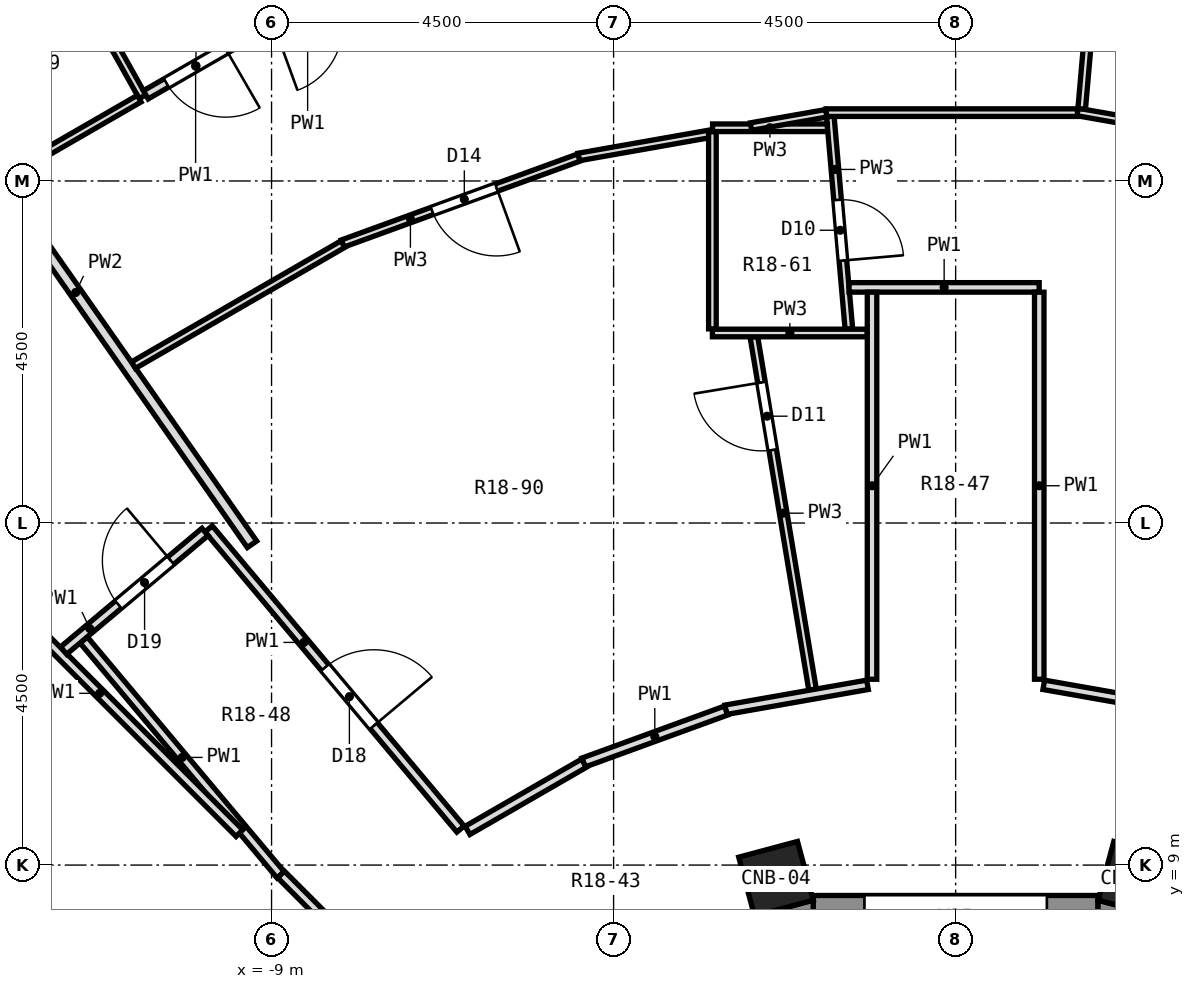
"""IFC4 building model, lengths in metres.
Left out: names, types, materials, properties, quantities, classifications, styles, units other than length and angle.
Written with IfcOpenShell. Run it as: python <this file> out.ifc"""

import sys

from ifc_helpers import new_model, si_unit, direction, frame, frame_2d, origin, origin_2d, place, context, subcontext, project, spatial, polyline, rectangle, outline, extrude, element, fill, save


model = new_model("IFC4")
c1 = context("Model", 3, precision=1e-05, world=origin(), true_north=direction((0.0, 1.0)))
c2 = subcontext(c1, "Body", "Model", "MODEL_VIEW")
j1 = project(units=[si_unit("LENGTHUNIT", "METRE"), si_unit("PLANEANGLEUNIT", "RADIAN")], contexts=[c1])
p1 = place(None, origin())
s1 = spatial("IfcSite", under=j1, at=p1, CompositionType="ELEMENT")
p2 = place(p1, origin())
s2 = spatial("IfcBuilding", under=s1, at=p2, CompositionType="ELEMENT")
p3 = place(p2, frame((0.0, 0.0, 101.8)))
s3 = spatial("IfcBuildingStorey", under=s2, at=p3, CompositionType="ELEMENT", Elevation=101.8)
for number, where, z_axis, x_axis in (
    (1, (2.364, 8.821, 0.0), (0.0, 0.0, 1.0), (0.259, 0.966, 0.0)),
    (2, (-2.364, 8.821, 0.0), (0.0, 0.0, 1.0), (-0.259, 0.966, 0.0)),
):
    element("IfcColumn", number, at=place(p3, frame(where, z_axis=z_axis, x_axis=x_axis)), inside=s3, PredefinedType="COLUMN", context=c2, shape_type="SweptSolid", body=[
        extrude(rectangle(XDim=0.8, YDim=0.8, at=origin_2d()), origin(), (0.0, 0.0, 1.0), 3.3),
    ])
p4 = place(p3, frame((1.874, 8.3, 0.0), z_axis=(0.0, 0.0, 1.0), x_axis=(-1.0, 0.0, 0.0)))
e3 = element("IfcWall", 3, at=p4, inside=s3, PredefinedType="SOLIDWALL", context=c2, shape_type="SweptSolid", body=[
    extrude(rectangle(XDim=3.748, YDim=0.6, at=frame_2d((1.874, 0.0))), origin(), (0.0, 0.0, 1.0), 2.8),
])
p5 = place(p4, frame((0.674, 0.0, 0.9)))
e4 = element("IfcOpeningElement", 4, at=p5, cuts=e3, PredefinedType="OPENING", context=c2, shape_type="SweptSolid", body=[
    extrude(rectangle(XDim=2.4, YDim=1.8, at=frame_2d((1.2, 0.9))), frame((0.0, 0.312, 0.0), z_axis=(0.0, -1.0, 0.0), x_axis=(1.0, 0.0, 0.0)), (0.0, 0.0, 1.0), 0.624),
])
p6 = place(p3, origin())
e5 = element("IfcWall", 5, at=p6, inside=s3, PredefinedType="SOLIDWALL", context=c2, shape_type="SweptSolid", body=[
    extrude(outline(polyline([(1.874, 8.538), (1.874, 8.0), (2.377, 7.865), (2.646, 8.331), (1.874, 8.538)])), origin(), (0.0, 0.0, 1.0), 2.8),
])
p7 = place(p3, origin())
e6 = element("IfcWall", 6, at=p7, inside=s3, PredefinedType="SOLIDWALL", context=c2, shape_type="SweptSolid", body=[
    extrude(outline(polyline([(-2.646, 8.331), (-2.377, 7.865), (-1.874, 8.0), (-1.874, 8.538), (-2.646, 8.331)])), origin(), (0.0, 0.0, 1.0), 2.8),
])
p8 = place(p3, frame((-1.649, 18.849, 0.0), z_axis=(0.0, 0.0, 1.0), x_axis=(0.087061215869, -0.996202963603, 0.0)))
e7 = element("IfcWall", 7, at=p8, inside=s3, PredefinedType="PARTITIONING", context=c2, shape_type="SweptSolid", body=[
    extrude(rectangle(XDim=2.807, YDim=0.1, at=frame_2d((1.404, 0.0))), origin(), (0.0, 0.0, 1.0), 2.8),
])
p9 = place(p8, frame((1.103, 0.0, 0.0)))
e8 = element("IfcOpeningElement", 8, at=p9, cuts=e7, PredefinedType="OPENING", context=c2, shape_type="SweptSolid", body=[
    extrude(rectangle(XDim=0.8, YDim=2.1, at=frame_2d((0.4, 1.05))), frame((0.0, 0.062, 0.0), z_axis=(0.0, -1.0, 0.0), x_axis=(1.0, 0.0, 0.0)), (0.0, 0.0, 1.0), 0.124),
])
p10 = place(p3, frame((-2.655, 15.951, 0.0), z_axis=(0.0, 0.0, 1.0), x_axis=(0.164012054584, -0.986458334625, 0.0)))
e9 = element("IfcWall", 9, at=p10, inside=s3, PredefinedType="PARTITIONING", context=c2, shape_type="SweptSolid", body=[
    extrude(rectangle(XDim=4.707, YDim=0.1, at=frame_2d((2.354, 0.0))), origin(), (0.0, 0.0, 1.0), 2.8),
])
p11 = place(p10, frame((0.61, 0.0, 0.0)))
e10 = element("IfcOpeningElement", 10, at=p11, cuts=e9, PredefinedType="OPENING", context=c2, shape_type="SweptSolid", body=[
    extrude(rectangle(XDim=0.9, YDim=2.1, at=frame_2d((0.45, 1.05))), frame((0.0, 0.062, 0.0), z_axis=(0.0, -1.0, 0.0), x_axis=(1.0, 0.0, 0.0)), (0.0, 0.0, 1.0), 0.124),
])
p12 = place(p3, frame((-11.822, 21.115, 0.0), z_axis=(0.0, 0.0, 1.0), x_axis=(0.488622759198, -0.872495157117, 0.0)))
e11 = element("IfcWall", 11, at=p12, inside=s3, PredefinedType="PARTITIONING", context=c2, shape_type="SweptSolid", body=[
    extrude(rectangle(XDim=2.3, YDim=0.1, at=frame_2d((1.15, 0.0))), origin(), (0.0, 0.0, 1.0), 2.8),
])
p13 = place(p3, frame((-13.896, 19.846, 0.0), z_axis=(0.0, 0.0, 1.0), x_axis=(0.573571733859, -0.819155336989, 0.0)))
e12 = element("IfcWall", 12, at=p13, inside=s3, PredefinedType="PARTITIONING", context=c2, shape_type="SweptSolid", body=[
    extrude(rectangle(XDim=8.088, YDim=0.15, at=frame_2d((4.044, 0.0))), origin(), (0.0, 0.0, 1.0), 2.8),
])
p14 = place(p3, frame((-11.472, 11.962, 0.0), z_axis=(0.0, 0.0, 1.0), x_axis=(0.642533165624, -0.766257875048, 0.0)))
e13 = element("IfcWall", 13, at=p14, inside=s3, PredefinedType="PARTITIONING", context=c2, shape_type="SweptSolid", body=[
    extrude(rectangle(XDim=4.033, YDim=0.125, at=frame_2d((2.017, 0.0))), origin(), (0.0, 0.0, 1.0), 2.8),
])
p15 = place(p3, frame((-9.828, 13.423, 0.0), z_axis=(0.0, 0.0, 1.0), x_axis=(0.642779949684, -0.766050870559, 0.0)))
e14 = element("IfcWall", 14, at=p15, inside=s3, PredefinedType="PARTITIONING", context=c2, shape_type="SweptSolid", body=[
    extrude(rectangle(XDim=5.155, YDim=0.125, at=frame_2d((2.578, 0.0))), origin(), (0.0, 0.0, 1.0), 2.8),
])
p16 = place(p15, frame((2.381, 0.0, 0.0)))
e15 = element("IfcOpeningElement", 15, at=p16, cuts=e14, PredefinedType="OPENING", context=c2, shape_type="SweptSolid", body=[
    extrude(rectangle(XDim=1.0, YDim=2.1, at=frame_2d((0.5, 1.05))), frame((0.0, 0.074, 0.0), z_axis=(0.0, -1.0, 0.0), x_axis=(1.0, 0.0, 0.0)), (0.0, 0.0, 1.0), 0.149),
])
p17 = place(p3, frame((-8.875, 8.876, 0.0), z_axis=(0.0, 0.0, 1.0), x_axis=(0.706666079052, -0.707547208826, 0.0)))
e16 = element("IfcWall", 16, at=p17, inside=s3, PredefinedType="PARTITIONING", context=c2, shape_type="SweptSolid", body=[
    extrude(rectangle(XDim=1.108, YDim=0.125, at=frame_2d((0.554, 0.0))), origin(), (0.0, 0.0, 1.0), 2.8),
])
p18 = place(p3, frame((-13.101, 13.099, 0.0), z_axis=(0.0, 0.0, 1.0), x_axis=(0.707106781187, -0.707106781187, 0.0)))
e17 = element("IfcWall", 17, at=p18, inside=s3, PredefinedType="PARTITIONING", context=c2, shape_type="SweptSolid", body=[
    extrude(rectangle(XDim=5.203, YDim=0.125, at=frame_2d((2.602, 0.0))), origin(), (0.0, 0.0, 1.0), 2.8),
])
p19 = place(p3, frame((1.16, 11.371, 0.0), z_axis=(0.0, 0.0, 1.0), x_axis=(0.984859944288, -0.173351925678, 0.0)))
e18 = element("IfcWall", 18, at=p19, inside=s3, PredefinedType="PARTITIONING", context=c2, shape_type="SweptSolid", body=[
    extrude(rectangle(XDim=1.768, YDim=0.125, at=frame_2d((0.884, 0.0))), origin(), (0.0, 0.0, 1.0), 2.8),
])
p20 = place(p3, frame((1.603, 18.908, 0.0), z_axis=(0.0, 0.0, 1.0), x_axis=(0.984831814927, -0.173511660439, 0.0)))
e19 = element("IfcWall", 19, at=p20, inside=s3, PredefinedType="PARTITIONING", context=c2, shape_type="SweptSolid", body=[
    extrude(rectangle(XDim=3.308, YDim=0.1, at=frame_2d((1.654, 0.0))), origin(), (0.0, 0.0, 1.0), 2.8),
])
p21 = place(p3, frame((-3.2, 16.0, 0.0), z_axis=(0.0, 0.0, 1.0), x_axis=(1.0, 0.0, 0.0)))
e20 = element("IfcWall", 20, at=p21, inside=s3, PredefinedType="PARTITIONING", context=c2, shape_type="SweptSolid", body=[
    extrude(rectangle(XDim=2.037, YDim=0.1, at=frame_2d((1.019, 0.0))), origin(), (0.0, 0.0, 1.0), 2.8),
])
p22 = place(p3, frame((-1.402, 16.6, 0.0), z_axis=(0.0, 0.0, 1.0), x_axis=(1.0, 0.0, 0.0)))
e21 = element("IfcWall", 21, at=p22, inside=s3, PredefinedType="PARTITIONING", context=c2, shape_type="SweptSolid", body=[
    extrude(rectangle(XDim=2.501, YDim=0.125, at=frame_2d((1.251, 0.0))), origin(), (0.0, 0.0, 1.0), 2.8),
])
p23 = place(p3, frame((-3.198, 18.7, 0.0), z_axis=(0.0, 0.0, 1.0), x_axis=(1.0, 0.0, 0.0)))
e22 = element("IfcWall", 22, at=p23, inside=s3, PredefinedType="PARTITIONING", context=c2, shape_type="SweptSolid", body=[
    extrude(rectangle(XDim=1.511, YDim=0.1, at=frame_2d((0.755, 0.0))), origin(), (0.0, 0.0, 1.0), 2.8),
])
p24 = place(p3, frame((-1.704, 18.899, 0.0), z_axis=(0.0, 0.0, 1.0), x_axis=(1.0, 0.0, 0.0)))
e23 = element("IfcWall", 23, at=p24, inside=s3, PredefinedType="PARTITIONING", context=c2, shape_type="SweptSolid", body=[
    extrude(rectangle(XDim=3.307, YDim=0.1, at=frame_2d((1.653, 0.0))), origin(), (0.0, 0.0, 1.0), 2.8),
])
p25 = place(p3, frame((-3.024, 11.043, 0.0), z_axis=(0.0, 0.0, 1.0), x_axis=(0.984843218933, 0.173446920187, 0.0)))
e24 = element("IfcWall", 24, at=p25, inside=s3, PredefinedType="PARTITIONING", context=c2, shape_type="SweptSolid", body=[
    extrude(rectangle(XDim=1.893, YDim=0.125, at=frame_2d((0.947, 0.0))), origin(), (0.0, 0.0, 1.0), 2.8),
])
p26 = place(p3, frame((-4.96, 18.315, 0.0), z_axis=(0.0, 0.0, 1.0), x_axis=(0.984767989426, 0.173873537385, 0.0)))
e25 = element("IfcWall", 25, at=p26, inside=s3, PredefinedType="PARTITIONING", context=c2, shape_type="SweptSolid", body=[
    extrude(rectangle(XDim=1.737, YDim=0.1, at=frame_2d((0.868, 0.0))), origin(), (0.0, 0.0, 1.0), 2.8),
])
p27 = place(p3, frame((-2.692, 18.716, 0.0), z_axis=(0.0, 0.0, 1.0), x_axis=(0.984773780307, 0.173840736366, 0.0)))
e26 = element("IfcWall", 26, at=p27, inside=s3, PredefinedType="PARTITIONING", context=c2, shape_type="SweptSolid", body=[
    extrude(rectangle(XDim=1.006, YDim=0.1, at=frame_2d((0.503, 0.0))), origin(), (0.0, 0.0, 1.0), 2.8),
])
p28 = place(p3, frame((-4.896, 10.349, 0.0), z_axis=(0.0, 0.0, 1.0), x_axis=(0.939546719529, 0.342420738016, 0.0)))
e27 = element("IfcWall", 27, at=p28, inside=s3, PredefinedType="PARTITIONING", context=c2, shape_type="SweptSolid", body=[
    extrude(rectangle(XDim=1.996, YDim=0.125, at=frame_2d((0.998, 0.0))), origin(), (0.0, 0.0, 1.0), 2.8),
])
p29 = place(p3, frame((-8.066, 17.177, 0.0), z_axis=(0.0, 0.0, 1.0), x_axis=(0.939726606236, 0.341926754629, 0.0)))
e28 = element("IfcWall", 28, at=p29, inside=s3, PredefinedType="PARTITIONING", context=c2, shape_type="SweptSolid", body=[
    extrude(rectangle(XDim=3.308, YDim=0.1, at=frame_2d((1.654, 0.0))), origin(), (0.0, 0.0, 1.0), 2.8),
])
p30 = place(p29, frame((1.254, 0.0, 0.0)))
e29 = element("IfcOpeningElement", 29, at=p30, cuts=e28, PredefinedType="OPENING", context=c2, shape_type="SweptSolid", body=[
    extrude(rectangle(XDim=0.9, YDim=2.1, at=frame_2d((0.45, 1.05))), frame((0.0, 0.062, 0.0), z_axis=(0.0, -1.0, 0.0), x_axis=(1.0, 0.0, 0.0)), (0.0, 0.0, 1.0), 0.124),
])
p31 = place(p3, frame((-6.421, 9.456, 0.0), z_axis=(0.0, 0.0, 1.0), x_axis=(0.866153397047, 0.499778243608, 0.0)))
e30 = element("IfcWall", 30, at=p31, inside=s3, PredefinedType="PARTITIONING", context=c2, shape_type="SweptSolid", body=[
    extrude(rectangle(XDim=1.768, YDim=0.125, at=frame_2d((0.884, 0.0))), origin(), (0.0, 0.0, 1.0), 2.8),
])
p32 = place(p3, frame((-10.816, 15.578, 0.0), z_axis=(0.0, 0.0, 1.0), x_axis=(0.865900530636, 0.500216224292, 0.0)))
e31 = element("IfcWall", 31, at=p32, inside=s3, PredefinedType="PARTITIONING", context=c2, shape_type="SweptSolid", body=[
    extrude(rectangle(XDim=3.181, YDim=0.1, at=frame_2d((1.591, 0.0))), origin(), (0.0, 0.0, 1.0), 2.8),
])
p33 = place(p3, frame((-12.542, 18.044, 0.0), z_axis=(0.0, 0.0, 1.0), x_axis=(0.866154304779, 0.499776670437, 0.0)))
e32 = element("IfcWall", 32, at=p33, inside=s3, PredefinedType="PARTITIONING", context=c2, shape_type="SweptSolid", body=[
    extrude(rectangle(XDim=2.079, YDim=0.1, at=frame_2d((1.04, 0.0))), origin(), (0.0, 0.0, 1.0), 2.8),
])
p34 = place(p3, frame((-10.655, 19.133, 0.0), z_axis=(0.0, 0.0, 1.0), x_axis=(0.866040510187, 0.49997383403, 0.0)))
e33 = element("IfcWall", 33, at=p34, inside=s3, PredefinedType="PARTITIONING", context=c2, shape_type="SweptSolid", body=[
    extrude(rectangle(XDim=1.513, YDim=0.125, at=frame_2d((0.757, 0.0))), origin(), (0.0, 0.0, 1.0), 2.8),
])
p35 = place(p34, frame((0.313, 0.0, 0.0)))
e34 = element("IfcOpeningElement", 34, at=p35, cuts=e33, PredefinedType="OPENING", context=c2, shape_type="SweptSolid", body=[
    extrude(rectangle(XDim=0.9, YDim=2.1, at=frame_2d((0.45, 1.05))), frame((0.0, 0.074, 0.0), z_axis=(0.0, -1.0, 0.0), x_axis=(1.0, 0.0, 0.0)), (0.0, 0.0, 1.0), 0.149),
])
p36 = place(p3, frame((-11.736, 11.822, 0.0), z_axis=(0.0, 0.0, 1.0), x_axis=(0.765966295507, 0.642880730888, 0.0)))
e35 = element("IfcWall", 35, at=p36, inside=s3, PredefinedType="PARTITIONING", context=c2, shape_type="SweptSolid", body=[
    extrude(rectangle(XDim=2.428, YDim=0.125, at=frame_2d((1.214, 0.0))), origin(), (0.0, 0.0, 1.0), 2.8),
])
p37 = place(p36, frame((0.941, 0.0, 0.0)))
e36 = element("IfcOpeningElement", 36, at=p37, cuts=e35, PredefinedType="OPENING", context=c2, shape_type="SweptSolid", body=[
    extrude(rectangle(XDim=0.9, YDim=2.1, at=frame_2d((0.45, 1.05))), frame((0.0, 0.074, 0.0), z_axis=(0.0, -1.0, 0.0), x_axis=(1.0, 0.0, 0.0)), (0.0, 0.0, 1.0), 0.149),
])
p38 = place(p3, frame((1.658, 18.949, 0.0), z_axis=(0.0, 0.0, 1.0), x_axis=(0.087052988713, 0.996203682565, 0.0)))
e37 = element("IfcWall", 37, at=p38, inside=s3, PredefinedType="PARTITIONING", context=c2, shape_type="SweptSolid", body=[
    extrude(rectangle(XDim=6.644, YDim=0.1, at=frame_2d((3.322, 0.0))), origin(), (0.0, 0.0, 1.0), 2.8),
])
for number, where, z_axis, x_axis in (
    (38, (1.1, 11.445, 0.0), (0.0, 0.0, 1.0), (0.0, 1.0, 0.0)),
    (39, (-1.1, 11.445, 0.0), (0.0, 0.0, 1.0), (0.0, 1.0, 0.0)),
):
    element("IfcWall", number, at=place(p3, frame(where, z_axis=z_axis, x_axis=x_axis)), inside=s3, PredefinedType="PARTITIONING", context=c2, shape_type="SweptSolid", body=[
        extrude(rectangle(XDim=5.092, YDim=0.125, at=frame_2d((2.546, 0.0))), origin(), (0.0, 0.0, 1.0), 2.8),
    ])
p39 = place(p3, frame((-3.2, 16.054, 0.0), z_axis=(0.0, 0.0, 1.0), x_axis=(0.0, 1.0, 0.0)))
e40 = element("IfcWall", 40, at=p39, inside=s3, PredefinedType="PARTITIONING", context=c2, shape_type="SweptSolid", body=[
    extrude(rectangle(XDim=2.594, YDim=0.1, at=frame_2d((1.297, 0.0))), origin(), (0.0, 0.0, 1.0), 2.8),
])
p40 = place(p5, origin())
e41 = element("IfcWindow", 41, at=p40, inside=s3, PartitioningType="SINGLE_PANEL", PredefinedType="WINDOW", context=c2, shape_type="SweptSolid", body=[
    extrude(rectangle(XDim=2.4, YDim=1.8, at=frame_2d((1.2, 0.9))), frame((0.0, -0.12, 0.0), z_axis=(0.0, -1.0, 0.0), x_axis=(1.0, 0.0, 0.0)), (0.0, 0.0, 1.0), 0.06),
])
fill(e4, e41)
p41 = place(p9, origin())
e42 = element("IfcDoor", 42, at=p41, inside=s3, OperationType="SINGLE_SWING_RIGHT", PredefinedType="DOOR", context=c2, shape_type="SweptSolid", body=[
    extrude(rectangle(XDim=0.8, YDim=2.1, at=frame_2d((0.4, 1.05))), frame((0.0, 0.025, 0.0), z_axis=(0.0, -1.0, 0.0), x_axis=(1.0, 0.0, 0.0)), (0.0, 0.0, 1.0), 0.05),
])
fill(e8, e42)
p42 = place(p11, frame((0.9, 0.0, 0.0), z_axis=(0.0, 0.0, 1.0), x_axis=(-1.0, 0.0, 0.0)))
e43 = element("IfcDoor", 43, at=p42, inside=s3, OperationType="SINGLE_SWING_RIGHT", PredefinedType="DOOR", context=c2, shape_type="SweptSolid", body=[
    extrude(rectangle(XDim=0.9, YDim=2.1, at=frame_2d((0.45, 1.05))), frame((0.0, 0.025, 0.0), z_axis=(0.0, -1.0, 0.0), x_axis=(1.0, 0.0, 0.0)), (0.0, 0.0, 1.0), 0.05),
])
fill(e10, e43)
p43 = place(p30, frame((0.9, 0.0, 0.0), z_axis=(0.0, 0.0, 1.0), x_axis=(-1.0, 0.0, 0.0)))
e44 = element("IfcDoor", 44, at=p43, inside=s3, OperationType="SINGLE_SWING_LEFT", PredefinedType="DOOR", context=c2, shape_type="SweptSolid", body=[
    extrude(rectangle(XDim=0.9, YDim=2.1, at=frame_2d((0.45, 1.05))), frame((0.0, 0.025, 0.0), z_axis=(0.0, -1.0, 0.0), x_axis=(1.0, 0.0, 0.0)), (0.0, 0.0, 1.0), 0.05),
])
fill(e29, e44)
p44 = place(p35, frame((0.9, 0.0, 0.0), z_axis=(0.0, 0.0, 1.0), x_axis=(-1.0, 0.0, 0.0)))
e45 = element("IfcDoor", 45, at=p44, inside=s3, OperationType="SINGLE_SWING_LEFT", PredefinedType="DOOR", context=c2, shape_type="SweptSolid", body=[
    extrude(rectangle(XDim=0.9, YDim=2.1, at=frame_2d((0.45, 1.05))), frame((0.0, 0.025, 0.0), z_axis=(0.0, -1.0, 0.0), x_axis=(1.0, 0.0, 0.0)), (0.0, 0.0, 1.0), 0.05),
])
fill(e34, e45)
p45 = place(p16, origin())
e46 = element("IfcDoor", 46, at=p45, inside=s3, OperationType="SINGLE_SWING_RIGHT", PredefinedType="DOOR", context=c2, shape_type="SweptSolid", body=[
    extrude(rectangle(XDim=1.0, YDim=2.1, at=frame_2d((0.5, 1.05))), frame((0.0, 0.025, 0.0), z_axis=(0.0, -1.0, 0.0), x_axis=(1.0, 0.0, 0.0)), (0.0, 0.0, 1.0), 0.05),
])
fill(e15, e46)
p46 = place(p37, origin())
e47 = element("IfcDoor", 47, at=p46, inside=s3, OperationType="SINGLE_SWING_RIGHT", PredefinedType="DOOR", context=c2, shape_type="SweptSolid", body=[
    extrude(rectangle(XDim=0.9, YDim=2.1, at=frame_2d((0.45, 1.05))), frame((0.0, 0.025, 0.0), z_axis=(0.0, -1.0, 0.0), x_axis=(1.0, 0.0, 0.0)), (0.0, 0.0, 1.0), 0.05),
])
fill(e36, e47)
save(model, sys.argv[1])
